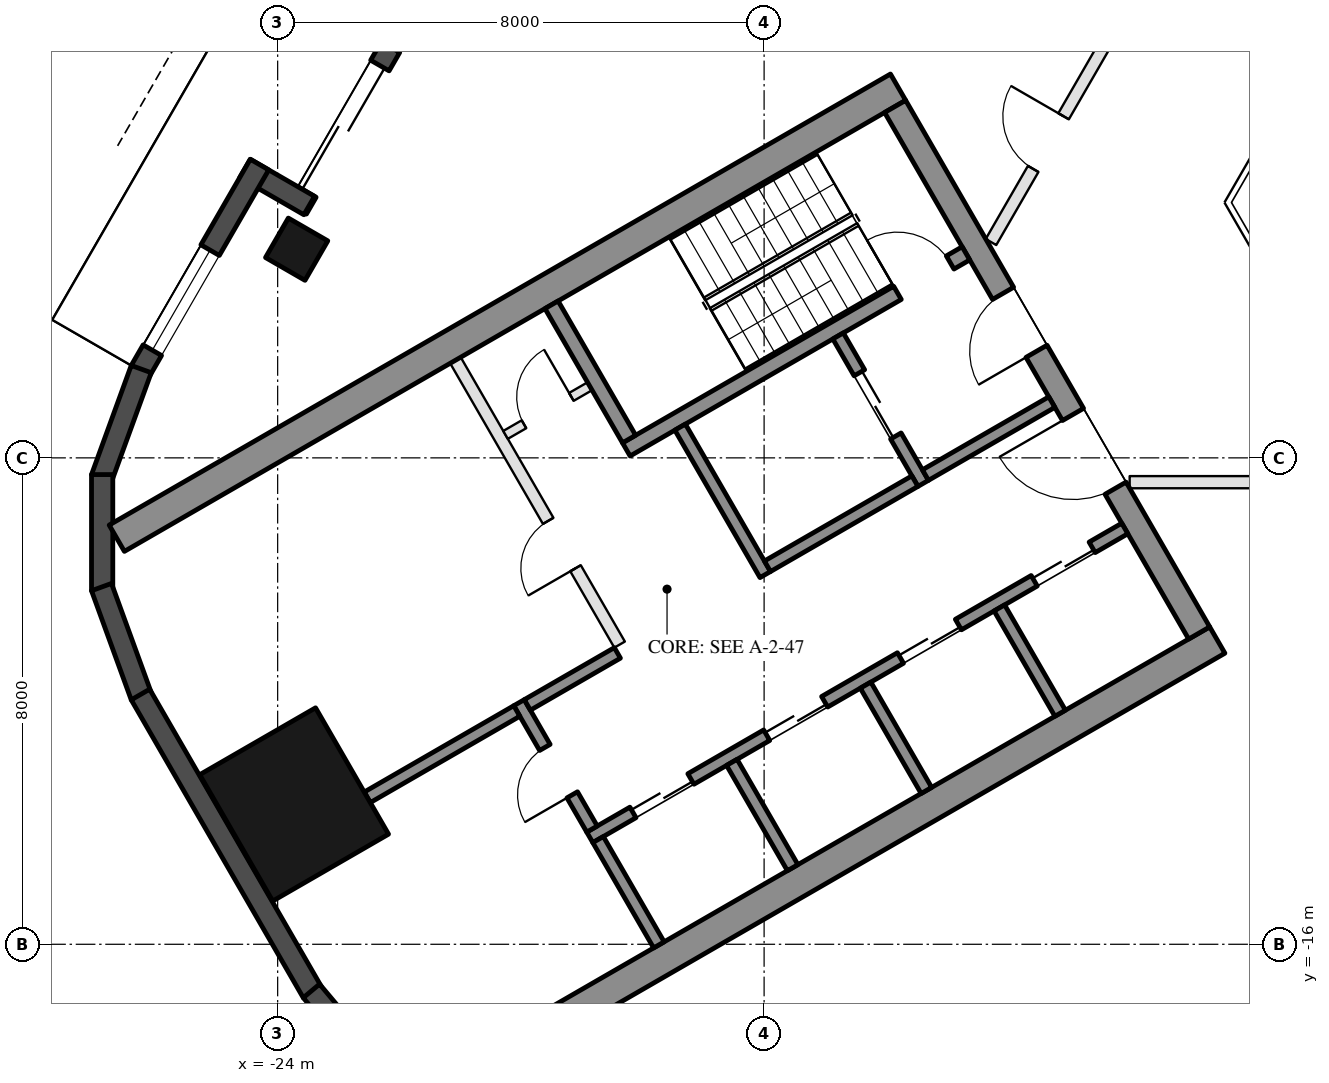
"""IFC4 building model, lengths in metres.
Left out: names, types, materials, properties, quantities, classifications, styles, units other than length and angle.
Written with IfcOpenShell. Run it as: python <this file> out.ifc"""

import sys

from ifc_helpers import new_model, si_unit, direction, frame, frame_2d, origin, origin_2d, place, context, subcontext, project, spatial, rectangle, hollow_rectangle, extrude, element, fill, save


model = new_model("IFC4")
c1 = context("Model", 3, precision=1e-05, world=origin(), true_north=direction((0.0, 1.0)))
c2 = subcontext(c1, "Body", "Model", "MODEL_VIEW")
j1 = project(units=[si_unit("LENGTHUNIT", "METRE"), si_unit("PLANEANGLEUNIT", "RADIAN")], contexts=[c1])
p1 = place(None, origin())
s1 = spatial("IfcSite", under=j1, at=p1, CompositionType="ELEMENT")
p2 = place(p1, origin())
s2 = spatial("IfcBuilding", under=s1, at=p2, CompositionType="ELEMENT")
p3 = place(p2, frame((0.0, 0.0, 205.8)))
s3 = spatial("IfcBuildingStorey", under=s2, at=p3, CompositionType="ELEMENT", Elevation=205.8)
p4 = place(p3, frame((-23.688, -4.568, 0.0), z_axis=(0.0, 0.0, 1.0), x_axis=(0.5, 0.866025403784, 0.0)))
e1 = element("IfcColumn", 1, at=p4, inside=s3, PredefinedType="COLUMN", context=c2, shape_type="SweptSolid", body=[
    extrude(hollow_rectangle(XDim=0.75, YDim=0.75, WallThickness=0.035, at=origin_2d()), origin(), (0.0, 0.0, 1.0), 3.7),
])
p5 = place(p3, frame((-23.729, -13.7, 0.0), z_axis=(0.0, 0.0, 1.0), x_axis=(-0.5, 0.866025403784, 0.0)))
e2 = element("IfcColumn", 2, at=p5, inside=s3, PredefinedType="COLUMN", context=c2, shape_type="SweptSolid", body=[
    extrude(hollow_rectangle(XDim=2.4, YDim=2.2, WallThickness=0.06, at=origin_2d()), origin(), (0.0, 0.0, 1.0), 3.7),
])
p6 = place(p3, frame((-20.309, 1.934, 0.0), z_axis=(0.0, 0.0, 1.0), x_axis=(-0.499992114976, -0.866029956157, 0.0)))
e3 = element("IfcWall", 3, at=p6, inside=s3, PredefinedType="SOLIDWALL", context=c2, shape_type="SweptSolid", body=[
    extrude(rectangle(XDim=6.74, YDim=0.35, at=frame_2d((3.37, 0.0))), origin(), (0.0, 0.0, 1.0), 3.55),
])
p7 = place(p6, frame((4.02, 0.0, 0.0)))
e4 = element("IfcOpeningElement", 4, at=p7, cuts=e3, PredefinedType="OPENING", context=c2, shape_type="SweptSolid", body=[
    extrude(rectangle(XDim=2.4, YDim=2.4, at=frame_2d((1.2, 1.2))), frame((0.0, 0.185, 0.0), z_axis=(0.0, -1.0, 0.0), x_axis=(1.0, 0.0, 0.0)), (0.0, 0.0, 1.0), 0.37),
])
p8 = place(p6, frame((0.77, 0.0, 0.3)))
e5 = element("IfcOpeningElement", 5, at=p8, cuts=e3, PredefinedType="OPENING", context=c2, shape_type="SweptSolid", body=[
    extrude(rectangle(XDim=2.9, YDim=2.65, at=frame_2d((1.45, 1.325))), frame((0.0, 0.185, 0.0), z_axis=(0.0, -1.0, 0.0), x_axis=(1.0, 0.0, 0.0)), (0.0, 0.0, 1.0), 0.37),
])
p9 = place(p3, frame((-23.481, -3.85, 0.0), z_axis=(0.0, 0.0, 1.0), x_axis=(-0.866092288191, 0.499884134912, 0.0)))
e6 = element("IfcWall", 6, at=p9, inside=s3, PredefinedType="SOLIDWALL", context=c2, shape_type="SweptSolid", body=[
    extrude(rectangle(XDim=1.22, YDim=0.35, at=frame_2d((0.61, 0.0))), origin(), (0.0, 0.0, 1.0), 3.55),
])
p10 = place(p3, frame((-24.299, -3.176, 0.0), z_axis=(0.0, 0.0, 1.0), x_axis=(-0.500028278809, -0.866009076391, 0.0)))
e7 = element("IfcWall", 7, at=p10, inside=s3, PredefinedType="SOLIDWALL", context=c2, shape_type="SweptSolid", body=[
    extrude(rectangle(XDim=3.916, YDim=0.35, at=frame_2d((1.958, 0.0))), origin(), (0.0, 0.0, 1.0), 3.55),
])
p11 = place(p10, frame((1.625, 0.0, 0.3)))
e8 = element("IfcOpeningElement", 8, at=p11, cuts=e7, PredefinedType="OPENING", context=c2, shape_type="SweptSolid", body=[
    extrude(rectangle(XDim=1.9, YDim=2.65, at=frame_2d((0.95, 1.325))), frame((0.0, 0.185, 0.0), z_axis=(0.0, -1.0, 0.0), x_axis=(1.0, 0.0, 0.0)), (0.0, 0.0, 1.0), 0.37),
])
for number, where, z_axis, x_axis in (
    (9, (-26.244, -6.54, 0.0), (0.0, 0.0, 1.0), (-0.342, -0.94, 0.0)),
    (10, (-26.886, -8.275, 0.0), (0.0, 0.0, 1.0), (0.0, -1.0, 0.0)),
    (11, (-26.897, -10.125, 0.0), (0.0, 0.0, 1.0), (0.342, -0.94, 0.0)),
):
    element("IfcWall", number, at=place(p3, frame(where, z_axis=z_axis, x_axis=x_axis)), inside=s3, PredefinedType="SOLIDWALL", context=c2, shape_type="SweptSolid", body=[
        extrude(rectangle(XDim=1.91, YDim=0.35, at=frame_2d((0.955, 0.0))), origin(), (0.0, 0.0, 1.0), 3.55),
    ])
p12 = place(p3, frame((-26.257, -11.893, 0.0), z_axis=(0.0, 0.0, 1.0), x_axis=(0.500018773155, -0.866014564827, 0.0)))
e12 = element("IfcWall", 12, at=p12, inside=s3, PredefinedType="SOLIDWALL", context=c2, shape_type="SweptSolid", body=[
    extrude(rectangle(XDim=5.658, YDim=0.35, at=frame_2d((2.829, 0.0))), origin(), (0.0, 0.0, 1.0), 3.55),
])
p13 = place(p3, frame((-23.445, -16.768, 0.0), z_axis=(0.0, 0.0, 1.0), x_axis=(0.642733291068, -0.76609001857, 0.0)))
e13 = element("IfcWall", 13, at=p13, inside=s3, PredefinedType="SOLIDWALL", context=c2, shape_type="SweptSolid", body=[
    extrude(rectangle(XDim=1.91, YDim=0.35, at=frame_2d((0.955, 0.0))), origin(), (0.0, 0.0, 1.0), 3.55),
])
for number, where, z_axis, x_axis in (
    (14, (-13.797, -1.903, 0.0), (0.0, 0.0, 1.0), (-0.866, -0.5, 0.0)),
    (15, (-8.547, -10.997, 0.0), (0.0, 0.0, 1.0), (-0.866, -0.5, 0.0)),
):
    element("IfcWall", number, at=place(p3, frame(where, z_axis=z_axis, x_axis=x_axis)), inside=s3, PredefinedType="SHEAR", context=c2, shape_type="SweptSolid", body=[
        extrude(rectangle(XDim=14.837, YDim=0.5, at=frame_2d((7.418, 0.0))), origin(), (0.0, 0.0, 1.0), 3.5),
    ])
p14 = place(p3, frame((-13.845, -2.22, 0.0), z_axis=(0.0, 0.0, 1.0), x_axis=(0.500004234368, -0.866022959057, 0.0)))
e16 = element("IfcWall", 16, at=p14, inside=s3, PredefinedType="SHEAR", context=c2, shape_type="SweptSolid", body=[
    extrude(rectangle(XDim=10.0, YDim=0.4, at=frame_2d((5.0, 0.0))), origin(), (0.0, 0.0, 1.0), 3.5),
])
p15 = place(p14, frame((3.55, 0.0, 0.0)))
e17 = element("IfcOpeningElement", 17, at=p15, cuts=e16, PredefinedType="OPENING", context=c2, shape_type="SweptSolid", body=[
    extrude(rectangle(XDim=1.1, YDim=2.1, at=frame_2d((0.55, 1.05))), frame((0.0, 0.21, 0.0), z_axis=(0.0, -1.0, 0.0), x_axis=(1.0, 0.0, 0.0)), (0.0, 0.0, 1.0), 0.42),
])
p16 = place(p14, frame((5.85, 0.0, 0.0)))
e18 = element("IfcOpeningElement", 18, at=p16, cuts=e16, PredefinedType="OPENING", context=c2, shape_type="SweptSolid", body=[
    extrude(rectangle(XDim=1.4, YDim=2.1, at=frame_2d((0.7, 1.05))), frame((0.0, 0.21, 0.0), z_axis=(0.0, -1.0, 0.0), x_axis=(1.0, 0.0, 0.0)), (0.0, 0.0, 1.0), 0.42),
])
p17 = place(p3, frame((-12.681, -4.636, 0.0), z_axis=(0.0, 0.0, 1.0), x_axis=(-0.866021702275, -0.500006411147, 0.0)))
e19 = element("IfcWall", 19, at=p17, inside=s3, PredefinedType="SHEAR", context=c2, shape_type="SweptSolid", body=[
    extrude(rectangle(XDim=6.45, YDim=0.25, at=frame_2d((3.225, 0.0))), origin(), (0.0, 0.0, 1.0), 3.5),
])
p18 = place(p17, frame((0.3, 0.0, 0.0)))
e20 = element("IfcOpeningElement", 20, at=p18, cuts=e19, PredefinedType="OPENING", context=c2, shape_type="SweptSolid", body=[
    extrude(rectangle(XDim=1.0, YDim=2.1, at=frame_2d((0.5, 1.05))), frame((0.0, 0.135, 0.0), z_axis=(0.0, -1.0, 0.0), x_axis=(1.0, 0.0, 0.0)), (0.0, 0.0, 1.0), 0.27),
])
p19 = place(p3, frame((-19.496, -5.482, 0.0), z_axis=(0.0, 0.0, 1.0), x_axis=(0.499990435942, -0.866030925526, 0.0)))
e21 = element("IfcWall", 21, at=p19, inside=s3, PredefinedType="SHEAR", context=c2, shape_type="SweptSolid", body=[
    extrude(rectangle(XDim=2.55, YDim=0.25, at=frame_2d((1.275, 0.0))), origin(), (0.0, 0.0, 1.0), 3.5),
])
p20 = place(p3, frame((-17.381, -7.495, 0.0), z_axis=(0.0, 0.0, 1.0), x_axis=(0.500011755427, -0.866018616679, 0.0)))
e22 = element("IfcWall", 22, at=p20, inside=s3, PredefinedType="SHEAR", context=c2, shape_type="SweptSolid", body=[
    extrude(rectangle(XDim=2.8, YDim=0.2, at=frame_2d((1.4, 0.0))), origin(), (0.0, 0.0, 1.0), 3.5),
])
p21 = place(p3, frame((-14.783, -5.995, 0.0), z_axis=(0.0, 0.0, 1.0), x_axis=(0.49994636267, -0.866056369097, 0.0)))
e23 = element("IfcWall", 23, at=p21, inside=s3, PredefinedType="SHEAR", context=c2, shape_type="SweptSolid", body=[
    extrude(rectangle(XDim=2.8, YDim=0.2, at=frame_2d((1.4, 0.0))), origin(), (0.0, 0.0, 1.0), 3.5),
])
p22 = place(p21, frame((0.7, 0.0, 0.0)))
e24 = element("IfcOpeningElement", 24, at=p22, cuts=e23, PredefinedType="OPENING", context=c2, shape_type="SweptSolid", body=[
    extrude(rectangle(XDim=1.2, YDim=2.1, at=frame_2d((0.6, 1.05))), frame((0.0, 0.11, 0.0), z_axis=(0.0, -1.0, 0.0), x_axis=(1.0, 0.0, 0.0)), (0.0, 0.0, 1.0), 0.22),
])
p23 = place(p3, frame((-13.52, -8.383, 0.0), z_axis=(0.0, 0.0, 1.0), x_axis=(-0.866034573852, -0.49998411664, 0.0)))
e25 = element("IfcWall", 25, at=p23, inside=s3, PredefinedType="SHEAR", context=c2, shape_type="SweptSolid", body=[
    extrude(rectangle(XDim=2.8, YDim=0.2, at=frame_2d((1.4, 0.0))), origin(), (0.0, 0.0, 1.0), 3.5),
])
p24 = place(p3, frame((-11.268, -7.083, 0.0), z_axis=(0.0, 0.0, 1.0), x_axis=(-0.866050077142, -0.499957262057, 0.0)))
e26 = element("IfcWall", 26, at=p24, inside=s3, PredefinedType="SHEAR", context=c2, shape_type="SweptSolid", body=[
    extrude(rectangle(XDim=2.4, YDim=0.2, at=frame_2d((1.2, 0.0))), origin(), (0.0, 0.0, 1.0), 3.5),
])
p25 = place(p3, frame((-10.068, -9.162, 0.0), z_axis=(0.0, 0.0, 1.0), x_axis=(-0.866032725843, -0.499987317609, 0.0)))
e27 = element("IfcWall", 27, at=p25, inside=s3, PredefinedType="SHEAR", context=c2, shape_type="SweptSolid", body=[
    extrude(rectangle(XDim=10.16, YDim=0.2, at=frame_2d((5.08, 0.0))), origin(), (0.0, 0.0, 1.0), 3.5),
])
p26 = place(p25, frame((0.62, 0.0, 0.0)))
e28 = element("IfcOpeningElement", 28, at=p26, cuts=e27, PredefinedType="OPENING", context=c2, shape_type="SweptSolid", body=[
    extrude(rectangle(XDim=1.1, YDim=2.1, at=frame_2d((0.55, 1.05))), frame((0.0, 0.11, 0.0), z_axis=(0.0, -1.0, 0.0), x_axis=(1.0, 0.0, 0.0)), (0.0, 0.0, 1.0), 0.22),
])
p27 = place(p25, frame((3.16, 0.0, 0.0)))
e29 = element("IfcOpeningElement", 29, at=p27, cuts=e27, PredefinedType="OPENING", context=c2, shape_type="SweptSolid", body=[
    extrude(rectangle(XDim=1.1, YDim=2.1, at=frame_2d((0.55, 1.05))), frame((0.0, 0.11, 0.0), z_axis=(0.0, -1.0, 0.0), x_axis=(1.0, 0.0, 0.0)), (0.0, 0.0, 1.0), 0.22),
])
p28 = place(p25, frame((5.7, 0.0, 0.0)))
e30 = element("IfcOpeningElement", 30, at=p28, cuts=e27, PredefinedType="OPENING", context=c2, shape_type="SweptSolid", body=[
    extrude(rectangle(XDim=1.1, YDim=2.1, at=frame_2d((0.55, 1.05))), frame((0.0, 0.11, 0.0), z_axis=(0.0, -1.0, 0.0), x_axis=(1.0, 0.0, 0.0)), (0.0, 0.0, 1.0), 0.22),
])
p29 = place(p25, frame((8.24, 0.0, 0.0)))
e31 = element("IfcOpeningElement", 31, at=p29, cuts=e27, PredefinedType="OPENING", context=c2, shape_type="SweptSolid", body=[
    extrude(rectangle(XDim=1.1, YDim=2.1, at=frame_2d((0.55, 1.05))), frame((0.0, 0.11, 0.0), z_axis=(0.0, -1.0, 0.0), x_axis=(1.0, 0.0, 0.0)), (0.0, 0.0, 1.0), 0.22),
])
p30 = place(p3, frame((-20.031, -12.026, 0.0), z_axis=(0.0, 0.0, 1.0), x_axis=(0.500033551112, -0.866006032174, 0.0)))
e32 = element("IfcWall", 32, at=p30, inside=s3, PredefinedType="SHEAR", context=c2, shape_type="SweptSolid", body=[
    extrude(rectangle(XDim=2.4, YDim=0.2, at=frame_2d((1.2, 0.0))), origin(), (0.0, 0.0, 1.0), 3.5),
])
p31 = place(p30, frame((0.85, 0.0, 0.0)))
e33 = element("IfcOpeningElement", 33, at=p31, cuts=e32, PredefinedType="OPENING", context=c2, shape_type="SweptSolid", body=[
    extrude(rectangle(XDim=0.9, YDim=2.1, at=frame_2d((0.45, 1.05))), frame((0.0, 0.11, 0.0), z_axis=(0.0, -1.0, 0.0), x_axis=(1.0, 0.0, 0.0)), (0.0, 0.0, 1.0), 0.22),
])
p32 = place(p3, frame((-18.413, -11.208, 0.0), z_axis=(0.0, 0.0, 1.0), x_axis=(-0.866038183914, -0.499977863513, 0.0)))
e34 = element("IfcWall", 34, at=p32, inside=s3, PredefinedType="SHEAR", context=c2, shape_type="SweptSolid", body=[
    extrude(rectangle(XDim=1.71, YDim=0.2, at=frame_2d((0.855, 0.0))), origin(), (0.0, 0.0, 1.0), 3.5),
])
for number, where, z_axis, x_axis in (
    (35, (-12.131, -10.468, 0.0), (0.0, 0.0, 1.0), (0.5, -0.866, 0.0)),
    (36, (-14.331, -11.738, 0.0), (0.0, 0.0, 1.0), (0.5, -0.866, 0.0)),
    (37, (-16.531, -13.008, 0.0), (0.0, 0.0, 1.0), (0.5, -0.866, 0.0)),
    (38, (-18.73, -14.278, 0.0), (0.0, 0.0, 1.0), (0.5, -0.866, 0.0)),
):
    element("IfcWall", number, at=place(p3, frame(where, z_axis=z_axis, x_axis=x_axis)), inside=s3, PredefinedType="SHEAR", context=c2, shape_type="SweptSolid", body=[
        extrude(rectangle(XDim=2.0, YDim=0.2, at=frame_2d((1.0, 0.0))), origin(), (0.0, 0.0, 1.0), 3.5),
    ])
p33 = place(p3, frame((-20.067, -12.163, 0.0), z_axis=(0.0, 0.0, 1.0), x_axis=(-0.866055327414, -0.49994816717, 0.0)))
e39 = element("IfcWall", 39, at=p33, inside=s3, PredefinedType="SHEAR", context=c2, shape_type="SweptSolid", body=[
    extrude(rectangle(XDim=2.84, YDim=0.2, at=frame_2d((1.42, 0.0))), origin(), (0.0, 0.0, 1.0), 3.5),
])
p34 = place(p3, frame((-21.076, -6.395, 0.0), z_axis=(0.0, 0.0, 1.0), x_axis=(0.50001468107, -0.866016927499, 0.0)))
e40 = element("IfcWall", 40, at=p34, inside=s3, PredefinedType="PARTITIONING", context=c2, shape_type="SweptSolid", body=[
    extrude(rectangle(XDim=5.4, YDim=0.2, at=frame_2d((2.7, 0.0))), origin(), (0.0, 0.0, 1.0), 3.5),
])
p35 = place(p34, frame((3.05, 0.0, 0.0)))
e41 = element("IfcOpeningElement", 41, at=p35, cuts=e40, PredefinedType="OPENING", context=c2, shape_type="SweptSolid", body=[
    extrude(rectangle(XDim=0.9, YDim=2.1, at=frame_2d((0.45, 1.05))), frame((0.0, 0.11, 0.0), z_axis=(0.0, -1.0, 0.0), x_axis=(1.0, 0.0, 0.0)), (0.0, 0.0, 1.0), 0.22),
])
p36 = place(p3, frame((-18.866, -6.822, 0.0), z_axis=(0.0, 0.0, 1.0), x_axis=(-0.866028054938, -0.499995408039, 0.0)))
e42 = element("IfcWall", 42, at=p36, inside=s3, PredefinedType="PARTITIONING", context=c2, shape_type="SweptSolid", body=[
    extrude(rectangle(XDim=1.6, YDim=0.15, at=frame_2d((0.8, 0.0))), origin(), (0.0, 0.0, 1.0), 3.5),
])
p37 = place(p36, frame((0.35, 0.0, 0.0)))
e43 = element("IfcOpeningElement", 43, at=p37, cuts=e42, PredefinedType="OPENING", context=c2, shape_type="SweptSolid", body=[
    extrude(rectangle(XDim=0.9, YDim=2.1, at=frame_2d((0.45, 1.05))), frame((0.0, 0.085, 0.0), z_axis=(0.0, -1.0, 0.0), x_axis=(1.0, 0.0, 0.0)), (0.0, 0.0, 1.0), 0.17),
])
p38 = place(p3, frame((-3.807, -8.4, 0.0), z_axis=(0.0, 0.0, 1.0), x_axis=(-1.0, 0.0, 0.0)))
e44 = element("IfcWall", 44, at=p38, inside=s3, PredefinedType="PARTITIONING", context=c2, shape_type="SweptSolid", body=[
    extrude(rectangle(XDim=6.181, YDim=0.2, at=frame_2d((3.091, 0.0))), origin(), (0.0, 0.0, 1.0), 2.95),
])
p39 = place(p38, frame((2.591, 0.0, 0.0)))
e45 = element("IfcOpeningElement", 45, at=p39, cuts=e44, PredefinedType="OPENING", context=c2, shape_type="SweptSolid", body=[
    extrude(rectangle(XDim=1.0, YDim=2.1, at=frame_2d((0.5, 1.05))), frame((0.0, 0.11, 0.0), z_axis=(0.0, -1.0, 0.0), x_axis=(1.0, 0.0, 0.0)), (0.0, 0.0, 1.0), 0.22),
])
p40 = place(p3, frame((-12.269, -4.45, 0.0), z_axis=(0.0, 0.0, 1.0), x_axis=(0.500019063067, 0.866014397438, 0.0)))
e46 = element("IfcWall", 46, at=p40, inside=s3, PredefinedType="PARTITIONING", context=c2, shape_type="SweptSolid", body=[
    extrude(rectangle(XDim=3.776, YDim=0.2, at=frame_2d((1.888, 0.0))), origin(), (0.0, 0.0, 1.0), 2.95),
])
p41 = place(p40, frame((1.388, 0.0, 0.0)))
e47 = element("IfcOpeningElement", 47, at=p41, cuts=e46, PredefinedType="OPENING", context=c2, shape_type="SweptSolid", body=[
    extrude(rectangle(XDim=1.0, YDim=2.1, at=frame_2d((0.5, 1.05))), frame((0.0, 0.11, 0.0), z_axis=(0.0, -1.0, 0.0), x_axis=(1.0, 0.0, 0.0)), (0.0, 0.0, 1.0), 0.22),
])
p42 = place(p7, frame((2.4, 0.0, 0.0), z_axis=(0.0, 0.0, 1.0), x_axis=(-1.0, 0.0, 0.0)))
e48 = element("IfcDoor", 48, at=p42, inside=s3, OperationType="SLIDING_TO_LEFT", PredefinedType="DOOR", context=c2, shape_type="SweptSolid", body=[
    extrude(rectangle(XDim=2.4, YDim=2.4, at=frame_2d((1.2, 1.2))), frame((0.0, 0.025, 0.0), z_axis=(0.0, -1.0, 0.0), x_axis=(1.0, 0.0, 0.0)), (0.0, 0.0, 1.0), 0.05),
])
fill(e4, e48)
p43 = place(p11, origin())
e49 = element("IfcWindow", 49, at=p43, inside=s3, PartitioningType="SINGLE_PANEL", PredefinedType="WINDOW", context=c2, shape_type="SweptSolid", body=[
    extrude(rectangle(XDim=1.9, YDim=2.65, at=frame_2d((0.95, 1.325))), frame((0.0, 0.03, 0.0), z_axis=(0.0, -1.0, 0.0), x_axis=(1.0, 0.0, 0.0)), (0.0, 0.0, 1.0), 0.06),
])
fill(e8, e49)
p44 = place(p22, origin())
e50 = element("IfcDoor", 50, at=p44, inside=s3, OperationType="DOUBLE_DOOR_SLIDING", PredefinedType="DOOR", context=c2, shape_type="SweptSolid", body=[
    extrude(rectangle(XDim=1.2, YDim=2.1, at=frame_2d((0.6, 1.05))), frame((0.0, 0.025, 0.0), z_axis=(0.0, -1.0, 0.0), x_axis=(1.0, 0.0, 0.0)), (0.0, 0.0, 1.0), 0.05),
])
fill(e24, e50)
p45 = place(p37, frame((0.9, 0.0, 0.0), z_axis=(0.0, 0.0, 1.0), x_axis=(-1.0, 0.0, 0.0)))
e51 = element("IfcDoor", 51, at=p45, inside=s3, OperationType="SINGLE_SWING_RIGHT", PredefinedType="DOOR", context=c2, shape_type="SweptSolid", body=[
    extrude(rectangle(XDim=0.9, YDim=2.1, at=frame_2d((0.45, 1.05))), frame((0.0, 0.025, 0.0), z_axis=(0.0, -1.0, 0.0), x_axis=(1.0, 0.0, 0.0)), (0.0, 0.0, 1.0), 0.05),
])
fill(e43, e51)
p46 = place(p26, origin())
e52 = element("IfcDoor", 52, at=p46, inside=s3, OperationType="DOUBLE_DOOR_SLIDING", PredefinedType="DOOR", context=c2, shape_type="SweptSolid", body=[
    extrude(rectangle(XDim=1.1, YDim=2.1, at=frame_2d((0.55, 1.05))), frame((0.0, 0.025, 0.0), z_axis=(0.0, -1.0, 0.0), x_axis=(1.0, 0.0, 0.0)), (0.0, 0.0, 1.0), 0.05),
])
fill(e28, e52)
p47 = place(p27, origin())
e53 = element("IfcDoor", 53, at=p47, inside=s3, OperationType="DOUBLE_DOOR_SLIDING", PredefinedType="DOOR", context=c2, shape_type="SweptSolid", body=[
    extrude(rectangle(XDim=1.1, YDim=2.1, at=frame_2d((0.55, 1.05))), frame((0.0, 0.025, 0.0), z_axis=(0.0, -1.0, 0.0), x_axis=(1.0, 0.0, 0.0)), (0.0, 0.0, 1.0), 0.05),
])
fill(e29, e53)
p48 = place(p28, origin())
e54 = element("IfcDoor", 54, at=p48, inside=s3, OperationType="DOUBLE_DOOR_SLIDING", PredefinedType="DOOR", context=c2, shape_type="SweptSolid", body=[
    extrude(rectangle(XDim=1.1, YDim=2.1, at=frame_2d((0.55, 1.05))), frame((0.0, 0.025, 0.0), z_axis=(0.0, -1.0, 0.0), x_axis=(1.0, 0.0, 0.0)), (0.0, 0.0, 1.0), 0.05),
])
fill(e30, e54)
p49 = place(p29, origin())
e55 = element("IfcDoor", 55, at=p49, inside=s3, OperationType="DOUBLE_DOOR_SLIDING", PredefinedType="DOOR", context=c2, shape_type="SweptSolid", body=[
    extrude(rectangle(XDim=1.1, YDim=2.1, at=frame_2d((0.55, 1.05))), frame((0.0, 0.025, 0.0), z_axis=(0.0, -1.0, 0.0), x_axis=(1.0, 0.0, 0.0)), (0.0, 0.0, 1.0), 0.05),
])
fill(e31, e55)
p50 = place(p31, frame((0.9, 0.0, 0.0), z_axis=(0.0, 0.0, 1.0), x_axis=(-1.0, 0.0, 0.0)))
e56 = element("IfcDoor", 56, at=p50, inside=s3, OperationType="SINGLE_SWING_LEFT", PredefinedType="DOOR", context=c2, shape_type="SweptSolid", body=[
    extrude(rectangle(XDim=0.9, YDim=2.1, at=frame_2d((0.45, 1.05))), frame((0.0, 0.025, 0.0), z_axis=(0.0, -1.0, 0.0), x_axis=(1.0, 0.0, 0.0)), (0.0, 0.0, 1.0), 0.05),
])
fill(e33, e56)
p51 = place(p35, frame((0.9, 0.0, 0.0), z_axis=(0.0, 0.0, 1.0), x_axis=(-1.0, 0.0, 0.0)))
e57 = element("IfcDoor", 57, at=p51, inside=s3, OperationType="SINGLE_SWING_LEFT", PredefinedType="DOOR", context=c2, shape_type="SweptSolid", body=[
    extrude(rectangle(XDim=0.9, YDim=2.1, at=frame_2d((0.45, 1.05))), frame((0.0, 0.025, 0.0), z_axis=(0.0, -1.0, 0.0), x_axis=(1.0, 0.0, 0.0)), (0.0, 0.0, 1.0), 0.05),
])
fill(e41, e57)
p52 = place(p15, frame((1.1, 0.0, 0.0), z_axis=(0.0, 0.0, 1.0), x_axis=(-1.0, 0.0, 0.0)))
e58 = element("IfcDoor", 58, at=p52, inside=s3, OperationType="SINGLE_SWING_LEFT", PredefinedType="DOOR", context=c2, shape_type="SweptSolid", body=[
    extrude(rectangle(XDim=1.1, YDim=2.1, at=frame_2d((0.55, 1.05))), frame((0.0, 0.025, 0.0), z_axis=(0.0, -1.0, 0.0), x_axis=(1.0, 0.0, 0.0)), (0.0, 0.0, 1.0), 0.05),
])
fill(e17, e58)
p53 = place(p16, frame((1.4, 0.0, 0.0), z_axis=(0.0, 0.0, 1.0), x_axis=(-1.0, 0.0, 0.0)))
e59 = element("IfcDoor", 59, at=p53, inside=s3, OperationType="DOUBLE_DOOR_SINGLE_SWING", PredefinedType="DOOR", context=c2, shape_type="SweptSolid", body=[
    extrude(rectangle(XDim=1.4, YDim=2.1, at=frame_2d((0.7, 1.05))), frame((0.0, 0.025, 0.0), z_axis=(0.0, -1.0, 0.0), x_axis=(1.0, 0.0, 0.0)), (0.0, 0.0, 1.0), 0.05),
])
fill(e18, e59)
p54 = place(p18, frame((1.0, 0.0, 0.0), z_axis=(0.0, 0.0, 1.0), x_axis=(-1.0, 0.0, 0.0)))
e60 = element("IfcDoor", 60, at=p54, inside=s3, OperationType="SINGLE_SWING_LEFT", PredefinedType="DOOR", context=c2, shape_type="SweptSolid", body=[
    extrude(rectangle(XDim=1.0, YDim=2.1, at=frame_2d((0.5, 1.05))), frame((0.0, 0.025, 0.0), z_axis=(0.0, -1.0, 0.0), x_axis=(1.0, 0.0, 0.0)), (0.0, 0.0, 1.0), 0.05),
])
fill(e20, e60)
p55 = place(p41, origin())
e61 = element("IfcDoor", 61, at=p55, inside=s3, OperationType="SINGLE_SWING_RIGHT", PredefinedType="DOOR", context=c2, shape_type="SweptSolid", body=[
    extrude(rectangle(XDim=1.0, YDim=2.1, at=frame_2d((0.5, 1.05))), frame((0.0, 0.025, 0.0), z_axis=(0.0, -1.0, 0.0), x_axis=(1.0, 0.0, 0.0)), (0.0, 0.0, 1.0), 0.05),
])
fill(e47, e61)
save(model, sys.argv[1])
